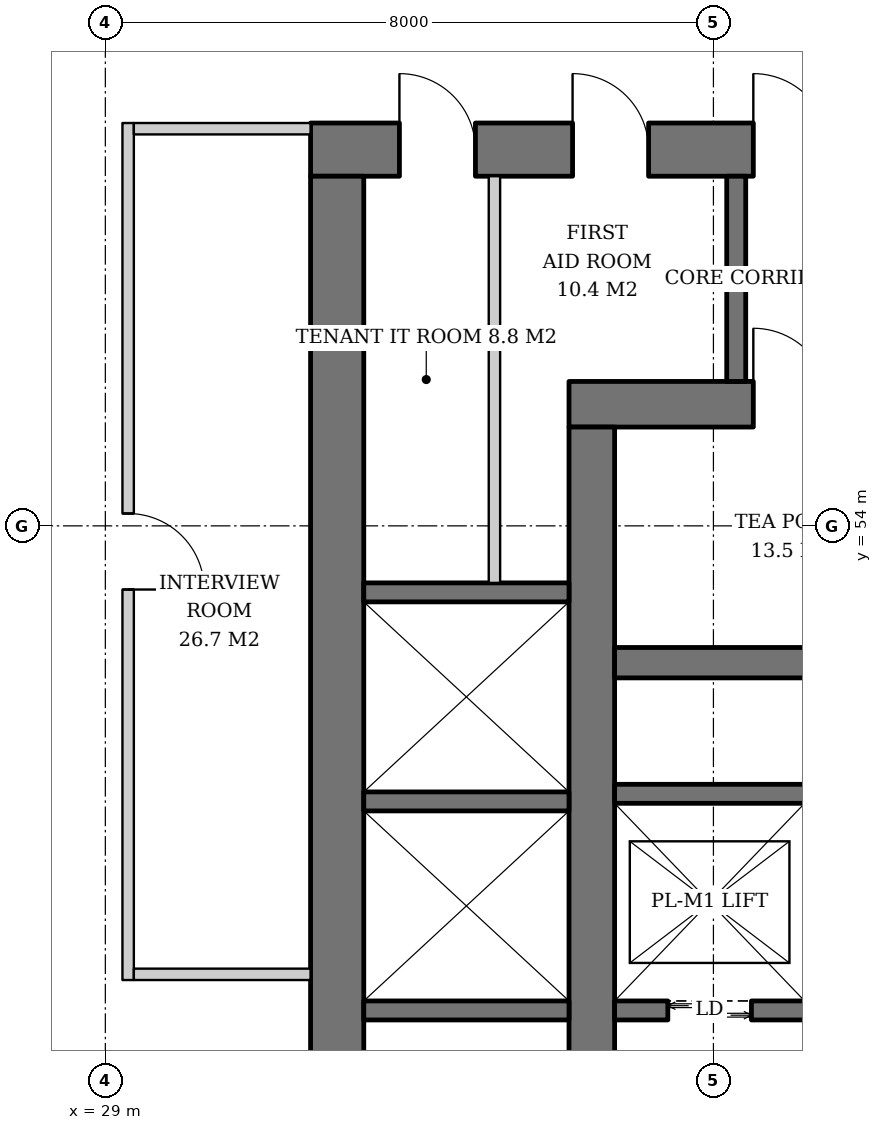
"""IFC4 building model, lengths in metres.
Left out: names, types, materials, properties, quantities, classifications, styles, units other than length and angle.
Written with IfcOpenShell. Run it as: python <this file> out.ifc"""

import sys

from ifc_helpers import new_model, si_unit, direction, frame, frame_2d, origin, place, context, subcontext, project, spatial, rectangle, extrude, element, fill, save


model = new_model("IFC4")
c1 = context("Model", 3, precision=1e-05, world=origin(), true_north=direction((0.0, 1.0)))
c2 = subcontext(c1, "Body", "Model", "MODEL_VIEW")
j1 = project(units=[si_unit("LENGTHUNIT", "METRE"), si_unit("PLANEANGLEUNIT", "RADIAN")], contexts=[c1])
p1 = place(None, origin())
s1 = spatial("IfcSite", under=j1, at=p1, CompositionType="ELEMENT")
p2 = place(p1, origin())
s2 = spatial("IfcBuilding", under=s1, at=p2, CompositionType="ELEMENT")
p3 = place(p2, frame((0.0, 0.0, 97.0)))
s3 = spatial("IfcBuildingStorey", under=s2, at=p3, CompositionType="ELEMENT", Elevation=97.0)
p4 = place(p3, frame((35.1, 55.6, 0.0), z_axis=(0.0, 0.0, 1.0), x_axis=(1.0, 0.0, 0.0)))
e1 = element("IfcWall", 1, at=p4, inside=s3, PredefinedType="SHEAR", context=c2, shape_type="SweptSolid", body=[
    extrude(rectangle(XDim=19.8, YDim=0.6, at=frame_2d((9.9, 0.0))), origin(), (0.0, 0.0, 1.0), 3.8),
])
p5 = place(p4, frame((14.54, 0.0, 0.0)))
e2 = element("IfcOpeningElement", 2, at=p5, cuts=e1, PredefinedType="OPENING", context=c2, shape_type="SweptSolid", body=[
    extrude(rectangle(XDim=1.0, YDim=2.1, at=frame_2d((0.5, 1.05))), frame((0.0, 0.31, 0.0), z_axis=(0.0, -1.0, 0.0), x_axis=(1.0, 0.0, 0.0)), (0.0, 0.0, 1.0), 0.62),
])
p6 = place(p4, frame((2.425, 0.0, 0.0)))
e3 = element("IfcOpeningElement", 3, at=p6, cuts=e1, PredefinedType="OPENING", context=c2, shape_type="SweptSolid", body=[
    extrude(rectangle(XDim=1.0, YDim=2.1, at=frame_2d((0.5, 1.05))), frame((0.0, 0.31, 0.0), z_axis=(0.0, -1.0, 0.0), x_axis=(1.0, 0.0, 0.0)), (0.0, 0.0, 1.0), 0.62),
])
p7 = place(p3, frame((35.4, 36.7, 0.0), z_axis=(0.0, 0.0, 1.0), x_axis=(0.0, 1.0, 0.0)))
e4 = element("IfcWall", 4, at=p7, inside=s3, PredefinedType="SHEAR", context=c2, shape_type="SweptSolid", body=[
    extrude(rectangle(XDim=18.6, YDim=0.6, at=frame_2d((9.3, 0.0))), origin(), (0.0, 0.0, 1.0), 3.8),
])
p8 = place(p7, frame((8.4, 0.0, 0.0)))
e5 = element("IfcOpeningElement", 5, at=p8, cuts=e4, PredefinedType="OPENING", context=c2, shape_type="SweptSolid", body=[
    extrude(rectangle(XDim=1.8, YDim=2.4, at=frame_2d((0.9, 1.2))), frame((0.0, 0.31, 0.0), z_axis=(0.0, -1.0, 0.0), x_axis=(1.0, 0.0, 0.0)), (0.0, 0.0, 1.0), 0.62),
])
p9 = place(p3, frame((31.7, 58.95, 0.0), z_axis=(0.0, 0.0, 1.0), x_axis=(1.0, 0.0, 0.0)))
e6 = element("IfcWall", 6, at=p9, inside=s3, PredefinedType="SHEAR", context=c2, shape_type="SweptSolid", body=[
    extrude(rectangle(XDim=26.6, YDim=0.7, at=frame_2d((13.3, 0.0))), origin(), (0.0, 0.0, 1.0), 3.8),
])
p10 = place(p9, frame((17.94, 0.0, 0.0)))
e7 = element("IfcOpeningElement", 7, at=p10, cuts=e6, PredefinedType="OPENING", context=c2, shape_type="SweptSolid", body=[
    extrude(rectangle(XDim=1.0, YDim=2.1, at=frame_2d((0.5, 1.05))), frame((0.0, 0.36, 0.0), z_axis=(0.0, -1.0, 0.0), x_axis=(1.0, 0.0, 0.0)), (0.0, 0.0, 1.0), 0.72),
])
p11 = place(p9, frame((5.825, 0.0, 0.0)))
e8 = element("IfcOpeningElement", 8, at=p11, cuts=e6, PredefinedType="OPENING", context=c2, shape_type="SweptSolid", body=[
    extrude(rectangle(XDim=1.0, YDim=2.1, at=frame_2d((0.5, 1.05))), frame((0.0, 0.36, 0.0), z_axis=(0.0, -1.0, 0.0), x_axis=(1.0, 0.0, 0.0)), (0.0, 0.0, 1.0), 0.72),
])
p12 = place(p9, frame((1.169, 0.0, 0.0)))
e9 = element("IfcOpeningElement", 9, at=p12, cuts=e6, PredefinedType="OPENING", context=c2, shape_type="SweptSolid", body=[
    extrude(rectangle(XDim=1.0, YDim=2.1, at=frame_2d((0.5, 1.05))), frame((0.0, 0.36, 0.0), z_axis=(0.0, -1.0, 0.0), x_axis=(1.0, 0.0, 0.0)), (0.0, 0.0, 1.0), 0.72),
])
p13 = place(p9, frame((3.447, 0.0, 0.0)))
e10 = element("IfcOpeningElement", 10, at=p13, cuts=e6, PredefinedType="OPENING", context=c2, shape_type="SweptSolid", body=[
    extrude(rectangle(XDim=1.0, YDim=2.1, at=frame_2d((0.5, 1.05))), frame((0.0, 0.36, 0.0), z_axis=(0.0, -1.0, 0.0), x_axis=(1.0, 0.0, 0.0)), (0.0, 0.0, 1.0), 0.72),
])
p14 = place(p9, frame((11.577, 0.0, 0.0)))
e11 = element("IfcOpeningElement", 11, at=p14, cuts=e6, PredefinedType="OPENING", context=c2, shape_type="SweptSolid", body=[
    extrude(rectangle(XDim=1.0, YDim=2.1, at=frame_2d((0.5, 1.05))), frame((0.0, 0.36, 0.0), z_axis=(0.0, -1.0, 0.0), x_axis=(1.0, 0.0, 0.0)), (0.0, 0.0, 1.0), 0.72),
])
p15 = place(p9, frame((20.9, 0.0, 0.0)))
e12 = element("IfcOpeningElement", 12, at=p15, cuts=e6, PredefinedType="OPENING", context=c2, shape_type="SweptSolid", body=[
    extrude(rectangle(XDim=1.0, YDim=2.1, at=frame_2d((0.5, 1.05))), frame((0.0, 0.36, 0.0), z_axis=(0.0, -1.0, 0.0), x_axis=(1.0, 0.0, 0.0)), (0.0, 0.0, 1.0), 0.72),
])
p16 = place(p9, frame((23.75, 0.0, 0.0)))
e13 = element("IfcOpeningElement", 13, at=p16, cuts=e6, PredefinedType="OPENING", context=c2, shape_type="SweptSolid", body=[
    extrude(rectangle(XDim=1.0, YDim=2.1, at=frame_2d((0.5, 1.05))), frame((0.0, 0.36, 0.0), z_axis=(0.0, -1.0, 0.0), x_axis=(1.0, 0.0, 0.0)), (0.0, 0.0, 1.0), 0.72),
])
p17 = place(p3, frame((32.05, 33.4, 0.0), z_axis=(0.0, 0.0, 1.0), x_axis=(0.0, 1.0, 0.0)))
e14 = element("IfcWall", 14, at=p17, inside=s3, PredefinedType="SHEAR", context=c2, shape_type="SweptSolid", body=[
    extrude(rectangle(XDim=25.2, YDim=0.7, at=frame_2d((12.6, 0.0))), origin(), (0.0, 0.0, 1.0), 3.8),
])
p18 = place(p17, frame((11.7, 0.0, 0.0)))
e15 = element("IfcOpeningElement", 15, at=p18, cuts=e14, PredefinedType="OPENING", context=c2, shape_type="SweptSolid", body=[
    extrude(rectangle(XDim=1.8, YDim=2.4, at=frame_2d((0.9, 1.2))), frame((0.0, 0.36, 0.0), z_axis=(0.0, -1.0, 0.0), x_axis=(1.0, 0.0, 0.0)), (0.0, 0.0, 1.0), 0.72),
])
p19 = place(p3, frame((35.7, 52.2, 0.0), z_axis=(0.0, 0.0, 1.0), x_axis=(1.0, 0.0, 0.0)))
e16 = element("IfcWall", 16, at=p19, inside=s3, PredefinedType="SHEAR", context=c2, shape_type="SweptSolid", body=[
    extrude(rectangle(XDim=18.6, YDim=0.4, at=frame_2d((9.3, 0.0))), origin(), (0.0, 0.0, 1.0), 3.8),
])
p20 = place(p3, frame((35.7, 50.475, 0.0), z_axis=(0.0, 0.0, 1.0), x_axis=(1.0, 0.0, 0.0)))
e17 = element("IfcWall", 17, at=p20, inside=s3, PredefinedType="SHEAR", context=c2, shape_type="SweptSolid", body=[
    extrude(rectangle(XDim=11.0, YDim=0.25, at=frame_2d((5.5, 0.0))), origin(), (0.0, 0.0, 1.0), 3.8),
])
p21 = place(p3, frame((35.7, 47.625, 0.0), z_axis=(0.0, 0.0, 1.0), x_axis=(1.0, 0.0, 0.0)))
e18 = element("IfcWall", 18, at=p21, inside=s3, PredefinedType="SHEAR", context=c2, shape_type="SweptSolid", body=[
    extrude(rectangle(XDim=12.83, YDim=0.25, at=frame_2d((6.415, 0.0))), origin(), (0.0, 0.0, 1.0), 3.8),
])
p22 = place(p21, frame((0.7, 0.0, 0.0)))
e19 = element("IfcOpeningElement", 19, at=p22, cuts=e18, PredefinedType="OPENING", context=c2, shape_type="SweptSolid", body=[
    extrude(rectangle(XDim=1.1, YDim=2.2, at=frame_2d((0.55, 1.1))), frame((0.0, 0.135, 0.0), z_axis=(0.0, -1.0, 0.0), x_axis=(1.0, 0.0, 0.0)), (0.0, 0.0, 1.0), 0.27),
])
p23 = place(p21, frame((3.45, 0.0, 0.0)))
e20 = element("IfcOpeningElement", 20, at=p23, cuts=e18, PredefinedType="OPENING", context=c2, shape_type="SweptSolid", body=[
    extrude(rectangle(XDim=1.1, YDim=2.2, at=frame_2d((0.55, 1.1))), frame((0.0, 0.135, 0.0), z_axis=(0.0, -1.0, 0.0), x_axis=(1.0, 0.0, 0.0)), (0.0, 0.0, 1.0), 0.27),
])
p24 = place(p21, frame((6.2, 0.0, 0.0)))
e21 = element("IfcOpeningElement", 21, at=p24, cuts=e18, PredefinedType="OPENING", context=c2, shape_type="SweptSolid", body=[
    extrude(rectangle(XDim=1.1, YDim=2.2, at=frame_2d((0.55, 1.1))), frame((0.0, 0.135, 0.0), z_axis=(0.0, -1.0, 0.0), x_axis=(1.0, 0.0, 0.0)), (0.0, 0.0, 1.0), 0.27),
])
p25 = place(p21, frame((8.95, 0.0, 0.0)))
e22 = element("IfcOpeningElement", 22, at=p25, cuts=e18, PredefinedType="OPENING", context=c2, shape_type="SweptSolid", body=[
    extrude(rectangle(XDim=1.1, YDim=2.2, at=frame_2d((0.55, 1.1))), frame((0.0, 0.135, 0.0), z_axis=(0.0, -1.0, 0.0), x_axis=(1.0, 0.0, 0.0)), (0.0, 0.0, 1.0), 0.27),
])
p26 = place(p21, frame((11.515, 0.0, 0.0)))
e23 = element("IfcOpeningElement", 23, at=p26, cuts=e18, PredefinedType="OPENING", context=c2, shape_type="SweptSolid", body=[
    extrude(rectangle(XDim=0.8, YDim=2.0, at=frame_2d((0.4, 1.0))), frame((0.0, 0.135, 0.0), z_axis=(0.0, -1.0, 0.0), x_axis=(1.0, 0.0, 0.0)), (0.0, 0.0, 1.0), 0.27),
])
for number, where, z_axis, x_axis in (
    (24, (32.4, 47.625, 0.0), (0.0, 0.0, 1.0), (1.0, 0.0, 0.0)),
    (25, (32.4, 50.375, 0.0), (0.0, 0.0, 1.0), (1.0, 0.0, 0.0)),
    (26, (32.4, 53.125, 0.0), (0.0, 0.0, 1.0), (1.0, 0.0, 0.0)),
):
    element("IfcWall", number, at=place(p3, frame(where, z_axis=z_axis, x_axis=x_axis)), inside=s3, PredefinedType="SHEAR", context=c2, shape_type="SweptSolid", body=[
        extrude(rectangle(XDim=2.7, YDim=0.25, at=frame_2d((1.35, 0.0))), origin(), (0.0, 0.0, 1.0), 3.8),
    ])
p27 = place(p3, frame((37.3, 55.9, 0.0), z_axis=(0.0, 0.0, 1.0), x_axis=(0.0, 1.0, 0.0)))
e27 = element("IfcWall", 27, at=p27, inside=s3, PredefinedType="SOLIDWALL", context=c2, shape_type="SweptSolid", body=[
    extrude(rectangle(XDim=2.7, YDim=0.25, at=frame_2d((1.35, 0.0))), origin(), (0.0, 0.0, 1.0), 3.62),
])
p28 = place(p3, frame((34.119, 53.25, 0.0), z_axis=(0.0, 0.0, 1.0), x_axis=(0.0, 1.0, 0.0)))
e28 = element("IfcWall", 28, at=p28, inside=s3, PredefinedType="SOLIDWALL", context=c2, shape_type="SweptSolid", body=[
    extrude(rectangle(XDim=5.35, YDim=0.15, at=frame_2d((2.675, 0.0))), origin(), (0.0, 0.0, 1.0), 3.62),
])
p29 = place(p3, frame((29.3, 59.3, 0.0), z_axis=(0.0, 0.0, 1.0), x_axis=(0.0, -1.0, 0.0)))
e29 = element("IfcWall", 29, at=p29, inside=s3, PredefinedType="PARTITIONING", context=c2, shape_type="SweptSolid", body=[
    extrude(rectangle(XDim=11.275, YDim=0.15, at=frame_2d((5.638, 0.0))), origin(), (0.0, 0.0, 1.0), 2.72),
])
p30 = place(p29, frame((5.137, 0.0, 0.0)))
e30 = element("IfcOpeningElement", 30, at=p30, cuts=e29, PredefinedType="OPENING", context=c2, shape_type="SweptSolid", body=[
    extrude(rectangle(XDim=1.0, YDim=2.1, at=frame_2d((0.5, 1.05))), frame((0.0, 0.085, 0.0), z_axis=(0.0, -1.0, 0.0), x_axis=(1.0, 0.0, 0.0)), (0.0, 0.0, 1.0), 0.17),
])
for number, where, z_axis, x_axis in (
    (31, (31.7, 59.225, 0.0), (0.0, 0.0, 1.0), (-1.0, 0.0, 0.0)),
    (32, (31.7, 48.1, 0.0), (0.0, 0.0, 1.0), (-1.0, 0.0, 0.0)),
):
    element("IfcWall", number, at=place(p3, frame(where, z_axis=z_axis, x_axis=x_axis)), inside=s3, PredefinedType="PARTITIONING", context=c2, shape_type="SweptSolid", body=[
        extrude(rectangle(XDim=2.325, YDim=0.15, at=frame_2d((1.163, 0.0))), origin(), (0.0, 0.0, 1.0), 3.62),
    ])
p31 = place(p22, origin())
e33 = element("IfcDoor", 33, at=p31, inside=s3, OperationType="DOUBLE_DOOR_SLIDING", PredefinedType="DOOR", context=c2, shape_type="SweptSolid", body=[
    extrude(rectangle(XDim=1.1, YDim=2.2, at=frame_2d((0.55, 1.1))), frame((0.0, 0.025, 0.0), z_axis=(0.0, -1.0, 0.0), x_axis=(1.0, 0.0, 0.0)), (0.0, 0.0, 1.0), 0.05),
])
fill(e19, e33)
p32 = place(p11, origin())
e34 = element("IfcDoor", 34, at=p32, inside=s3, OperationType="SINGLE_SWING_LEFT", PredefinedType="DOOR", context=c2, shape_type="SweptSolid", body=[
    extrude(rectangle(XDim=1.0, YDim=2.1, at=frame_2d((0.5, 1.05))), frame((0.0, 0.025, 0.0), z_axis=(0.0, -1.0, 0.0), x_axis=(1.0, 0.0, 0.0)), (0.0, 0.0, 1.0), 0.05),
])
fill(e8, e34)
p33 = place(p6, origin())
e35 = element("IfcDoor", 35, at=p33, inside=s3, OperationType="SINGLE_SWING_LEFT", PredefinedType="DOOR", context=c2, shape_type="SweptSolid", body=[
    extrude(rectangle(XDim=1.0, YDim=2.1, at=frame_2d((0.5, 1.05))), frame((0.0, -0.24, 0.0), z_axis=(0.0, -1.0, 0.0), x_axis=(1.0, 0.0, 0.0)), (0.0, 0.0, 1.0), 0.05),
])
fill(e3, e35)
p34 = place(p12, origin())
e36 = element("IfcDoor", 36, at=p34, inside=s3, OperationType="SINGLE_SWING_LEFT", PredefinedType="DOOR", context=c2, shape_type="SweptSolid", body=[
    extrude(rectangle(XDim=1.0, YDim=2.1, at=frame_2d((0.5, 1.05))), frame((0.0, -0.29, 0.0), z_axis=(0.0, -1.0, 0.0), x_axis=(1.0, 0.0, 0.0)), (0.0, 0.0, 1.0), 0.05),
])
fill(e9, e36)
p35 = place(p13, origin())
e37 = element("IfcDoor", 37, at=p35, inside=s3, OperationType="SINGLE_SWING_LEFT", PredefinedType="DOOR", context=c2, shape_type="SweptSolid", body=[
    extrude(rectangle(XDim=1.0, YDim=2.1, at=frame_2d((0.5, 1.05))), frame((0.0, -0.29, 0.0), z_axis=(0.0, -1.0, 0.0), x_axis=(1.0, 0.0, 0.0)), (0.0, 0.0, 1.0), 0.05),
])
fill(e10, e37)
p36 = place(p30, origin())
e38 = element("IfcDoor", 38, at=p36, inside=s3, OperationType="SINGLE_SWING_RIGHT", PredefinedType="DOOR", context=c2, shape_type="SweptSolid", body=[
    extrude(rectangle(XDim=1.0, YDim=2.1, at=frame_2d((0.5, 1.05))), frame((0.0, 0.025, 0.0), z_axis=(0.0, -1.0, 0.0), x_axis=(1.0, 0.0, 0.0)), (0.0, 0.0, 1.0), 0.05),
])
fill(e30, e38)
save(model, sys.argv[1])
